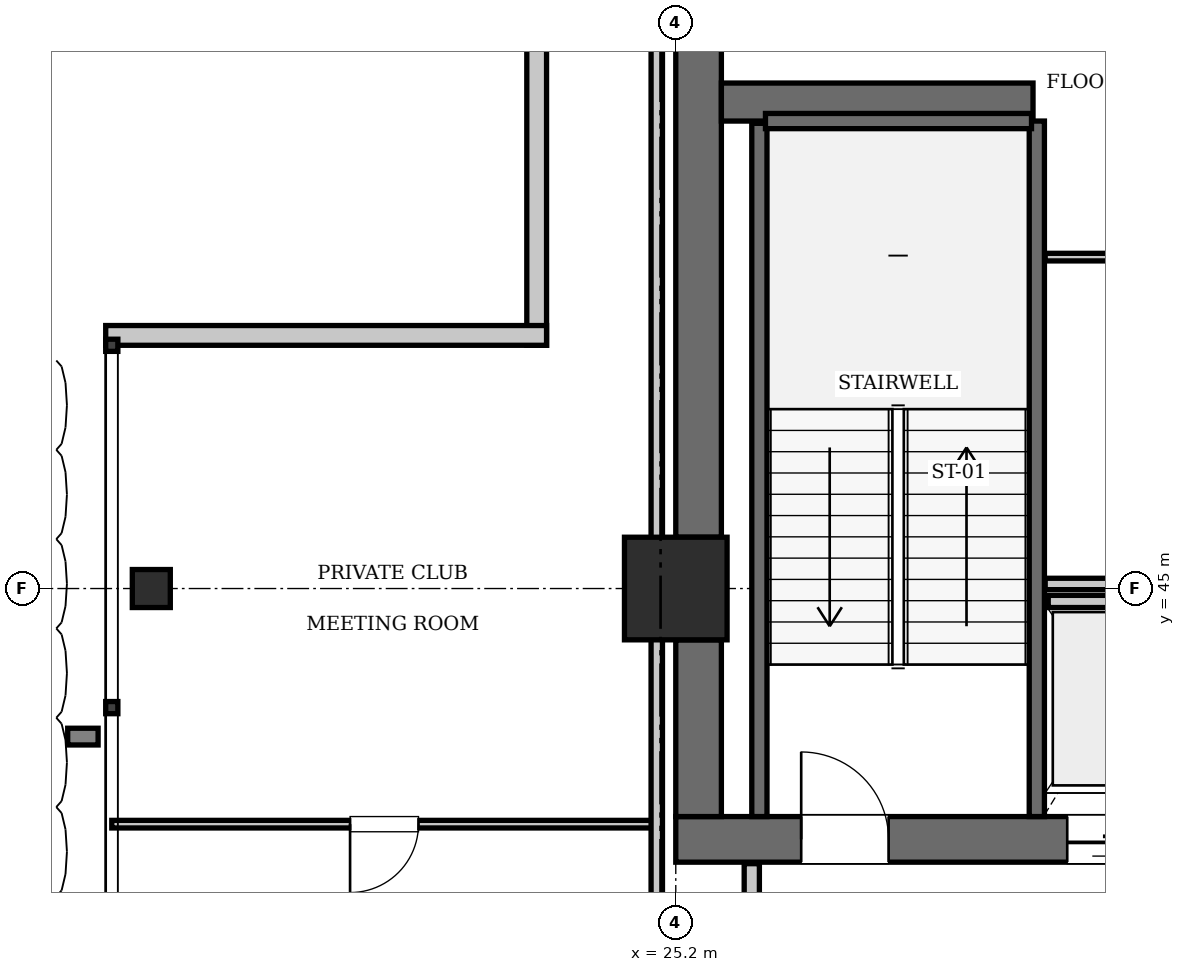
"""IFC4 building model, lengths in metres.
Left out: names, types, materials, properties, quantities, classifications, styles, units other than length and angle.
Written with IfcOpenShell. Run it as: python <this file> out.ifc"""

import sys

from ifc_helpers import new_model, si_unit, direction, frame, frame_2d, origin, origin_2d, place, context, subcontext, project, spatial, rectangle, i_section, extrude, element, fill, save


model = new_model("IFC4")
c1 = context("Model", 3, precision=1e-05, world=origin(), true_north=direction((0.0, 1.0)))
c2 = subcontext(c1, "Body", "Model", "MODEL_VIEW")
j1 = project(units=[si_unit("LENGTHUNIT", "METRE"), si_unit("PLANEANGLEUNIT", "RADIAN")], contexts=[c1])
p1 = place(None, origin())
s1 = spatial("IfcSite", under=j1, at=p1, CompositionType="ELEMENT")
p2 = place(p1, origin())
s2 = spatial("IfcBuilding", under=s1, at=p2, CompositionType="ELEMENT")
p3 = place(p2, frame((0.0, 0.0, 349.65)))
s3 = spatial("IfcBuildingStorey", under=s2, at=p3, CompositionType="ELEMENT", Elevation=349.65)
p4 = place(p3, frame((25.2, 45.0, 0.0), z_axis=(0.0, 0.0, 1.0), x_axis=(1.0, 0.0, 0.0)))
e1 = element("IfcColumn", 1, at=p4, inside=s3, PredefinedType="COLUMN", context=c2, shape_type="SweptSolid", body=[
    extrude(rectangle(XDim=1.35, YDim=1.35, at=origin_2d()), origin(), (0.0, 0.0, 1.0), 4.55),
])
p5 = place(p3, frame((25.2, 41.7, 0.0), z_axis=(0.0, 0.0, 1.0), x_axis=(1.0, 0.0, 0.0)))
e2 = element("IfcWall", 2, at=p5, inside=s3, PredefinedType="SHEAR", context=c2, shape_type="SweptSolid", body=[
    extrude(rectangle(XDim=6.8, YDim=0.6, at=frame_2d((3.4, 0.0))), origin(), (0.0, 0.0, 1.0), 4.55),
])
p6 = place(p5, frame((1.65, 0.0, 0.0)))
e3 = element("IfcOpeningElement", 3, at=p6, cuts=e2, PredefinedType="OPENING", context=c2, shape_type="SweptSolid", body=[
    extrude(rectangle(XDim=1.15, YDim=2.15, at=frame_2d((0.575, 1.075))), frame((0.0, 0.31, 0.0), z_axis=(0.0, -1.0, 0.0), x_axis=(1.0, 0.0, 0.0)), (0.0, 0.0, 1.0), 0.62),
])
p7 = place(p5, frame((5.15, 0.0, 0.0)))
e4 = element("IfcOpeningElement", 4, at=p7, cuts=e2, PredefinedType="OPENING", context=c2, shape_type="SweptSolid", body=[
    extrude(rectangle(XDim=1.1, YDim=2.2, at=frame_2d((0.55, 1.1))), frame((0.0, 0.31, 0.0), z_axis=(0.0, -1.0, 0.0), x_axis=(1.0, 0.0, 0.0)), (0.0, 0.0, 1.0), 0.62),
])
p8 = place(p3, frame((25.5, 42.0, 0.0), z_axis=(0.0, 0.0, 1.0), x_axis=(0.0, 1.0, 0.0)))
e5 = element("IfcWall", 5, at=p8, inside=s3, PredefinedType="SHEAR", context=c2, shape_type="SweptSolid", body=[
    extrude(rectangle(XDim=2.325, YDim=0.6, at=frame_2d((1.163, 0.0))), origin(), (0.0, 0.0, 1.0), 4.55),
])
p9 = place(p3, frame((25.5, 45.675, 0.0), z_axis=(0.0, 0.0, 1.0), x_axis=(0.0, 1.0, 0.0)))
e6 = element("IfcWall", 6, at=p9, inside=s3, PredefinedType="SHEAR", context=c2, shape_type="SweptSolid", body=[
    extrude(rectangle(XDim=7.725, YDim=0.6, at=frame_2d((3.862, 0.0))), origin(), (0.0, 0.0, 1.0), 4.55),
])
p10 = place(p3, frame((25.8, 51.4, 0.0), z_axis=(0.0, 0.0, 1.0), x_axis=(1.0, 0.0, 0.0)))
e7 = element("IfcWall", 7, at=p10, inside=s3, PredefinedType="SHEAR", context=c2, shape_type="SweptSolid", body=[
    extrude(rectangle(XDim=4.1, YDim=0.5, at=frame_2d((2.05, 0.0))), origin(), (0.0, 0.0, 1.0), 4.55),
])
p11 = place(p3, frame((18.3, 45.0, 0.0), z_axis=(0.0, 0.0, 1.0), x_axis=(1.0, 0.0, 0.0)))
e8 = element("IfcColumn", 8, at=p11, inside=s3, PredefinedType="COLUMN", context=c2, shape_type="SweptSolid", body=[
    extrude(i_section(OverallWidth=0.5, OverallDepth=0.5, WebThickness=0.022, FlangeThickness=0.032, at=origin_2d()), origin(), (0.0, 0.0, 1.0), 4.55),
])
p12 = place(p3, frame((29.95, 42.0, 0.0), z_axis=(0.0, 0.0, 1.0), x_axis=(0.0, 1.0, 0.0)))
e9 = element("IfcWall", 9, at=p12, inside=s3, PredefinedType="SOLIDWALL", context=c2, shape_type="SweptSolid", body=[
    extrude(rectangle(XDim=9.15, YDim=0.2, at=frame_2d((4.575, 0.0))), origin(), (0.0, 0.0, 1.0), 4.29),
])
p13 = place(p3, frame((26.3, 42.0, 0.0), z_axis=(0.0, 0.0, 1.0), x_axis=(0.0, 1.0, 0.0)))
e10 = element("IfcWall", 10, at=p13, inside=s3, PredefinedType="SOLIDWALL", context=c2, shape_type="SweptSolid", body=[
    extrude(rectangle(XDim=9.12, YDim=0.2, at=frame_2d((4.56, 0.0))), origin(), (0.0, 0.0, 1.0), 4.29),
])
p14 = place(p3, frame((26.38, 51.15, 0.0), z_axis=(0.0, 0.0, 1.0), x_axis=(1.0, 0.0, 0.0)))
e11 = element("IfcWall", 11, at=p14, inside=s3, PredefinedType="SOLIDWALL", context=c2, shape_type="SweptSolid", body=[
    extrude(rectangle(XDim=3.5, YDim=0.2, at=frame_2d((1.75, 0.0))), origin(), (0.0, 0.0, 1.0), 4.29),
])
p15 = place(p3, frame((30.1, 44.83, 0.0), z_axis=(0.0, 0.0, 1.0), x_axis=(1.0, 0.0, 0.0)))
e12 = element("IfcWall", 12, at=p15, inside=s3, PredefinedType="SOLIDWALL", context=c2, shape_type="SweptSolid", body=[
    extrude(rectangle(XDim=1.6, YDim=0.16, at=frame_2d((0.8, 0.0))), origin(), (0.0, 0.0, 1.0), 4.29),
])
for number, where, z_axis, x_axis in (
    (13, (23.37, 48.2, 0.0), (0.0, 0.0, 1.0), (0.0, 1.0, 0.0)),
    (14, (17.7, 48.33, 0.0), (0.0, 0.0, 1.0), (1.0, 0.0, 0.0)),
):
    element("IfcWall", number, at=place(p3, frame(where, z_axis=z_axis, x_axis=x_axis)), inside=s3, PredefinedType="SOLIDWALL", context=c2, shape_type="SweptSolid", body=[
        extrude(rectangle(XDim=5.8, YDim=0.26, at=frame_2d((2.9, 0.0))), origin(), (0.0, 0.0, 1.0), 4.29),
    ])
p16 = place(p3, frame((26.2, 38.31, 0.0), z_axis=(0.0, 0.0, 1.0), x_axis=(0.0, 1.0, 0.0)))
e15 = element("IfcWall", 15, at=p16, inside=s3, PredefinedType="PARTITIONING", context=c2, shape_type="SweptSolid", body=[
    extrude(rectangle(XDim=3.07, YDim=0.2, at=frame_2d((1.535, 0.0))), origin(), (0.0, 0.0, 1.0), 4.29),
])
p17 = place(p3, frame((30.06, 45.06, 0.0), z_axis=(0.0, 0.0, 1.0), x_axis=(1.0, 0.0, 0.0)))
e16 = element("IfcWall", 16, at=p17, inside=s3, PredefinedType="PARTITIONING", context=c2, shape_type="SweptSolid", body=[
    extrude(rectangle(XDim=3.18, YDim=0.15, at=frame_2d((1.59, 0.0))), origin(), (0.0, 0.0, 1.0), 4.29),
])
p18 = place(p3, frame((30.06, 49.36, 0.0), z_axis=(0.0, 0.0, 1.0), x_axis=(1.0, 0.0, 0.0)))
e17 = element("IfcWall", 17, at=p18, inside=s3, PredefinedType="PARTITIONING", context=c2, shape_type="SweptSolid", body=[
    extrude(rectangle(XDim=3.18, YDim=0.1, at=frame_2d((1.59, 0.0))), origin(), (0.0, 0.0, 1.0), 4.29),
])
p19 = place(p18, frame((1.95, 0.0, 0.0)))
e18 = element("IfcOpeningElement", 18, at=p19, cuts=e17, PredefinedType="OPENING", context=c2, shape_type="SweptSolid", body=[
    extrude(rectangle(XDim=0.8, YDim=2.05, at=frame_2d((0.4, 1.025))), frame((0.0, 0.06, 0.0), z_axis=(0.0, -1.0, 0.0), x_axis=(1.0, 0.0, 0.0)), (0.0, 0.0, 1.0), 0.12),
])
p20 = place(p3, frame((17.78, 41.9, 0.0), z_axis=(0.0, 0.0, 1.0), x_axis=(1.0, 0.0, 0.0)))
e19 = element("IfcWall", 19, at=p20, inside=s3, PredefinedType="PARTITIONING", context=c2, shape_type="SweptSolid", body=[
    extrude(rectangle(XDim=7.17, YDim=0.1, at=frame_2d((3.585, 0.0))), origin(), (0.0, 0.0, 1.0), 4.29),
])
p21 = place(p20, frame((3.135, 0.0, 0.0)))
e20 = element("IfcOpeningElement", 20, at=p21, cuts=e19, PredefinedType="OPENING", context=c2, shape_type="SweptSolid", body=[
    extrude(rectangle(XDim=0.9, YDim=2.1, at=frame_2d((0.45, 1.05))), frame((0.0, 0.06, 0.0), z_axis=(0.0, -1.0, 0.0), x_axis=(1.0, 0.0, 0.0)), (0.0, 0.0, 1.0), 0.12),
])
p22 = place(p3, frame((24.95, 35.14, 0.0), z_axis=(0.0, 0.0, 1.0), x_axis=(0.0, 1.0, 0.0)))
e21 = element("IfcWall", 21, at=p22, inside=s3, PredefinedType="PARTITIONING", context=c2, shape_type="SweptSolid", body=[
    extrude(rectangle(XDim=18.78, YDim=0.15, at=frame_2d((9.39, 0.0))), origin(), (0.0, 0.0, 1.0), 4.29),
])
p23 = place(p6, origin())
e22 = element("IfcDoor", 22, at=p23, inside=s3, OperationType="SINGLE_SWING_LEFT", PredefinedType="DOOR", context=c2, shape_type="SweptSolid", body=[
    extrude(rectangle(XDim=1.15, YDim=2.15, at=frame_2d((0.575, 1.075))), frame((0.0, 0.025, 0.0), z_axis=(0.0, -1.0, 0.0), x_axis=(1.0, 0.0, 0.0)), (0.0, 0.0, 1.0), 0.05),
])
fill(e3, e22)
p24 = place(p7, frame((1.1, 0.0, 0.0), z_axis=(0.0, 0.0, 1.0), x_axis=(-1.0, 0.0, 0.0)))
e23 = element("IfcDoor", 23, at=p24, inside=s3, OperationType="SLIDING_TO_LEFT", PredefinedType="DOOR", context=c2, shape_type="SweptSolid", body=[
    extrude(rectangle(XDim=1.1, YDim=2.2, at=frame_2d((0.55, 1.1))), frame((0.0, 0.025, 0.0), z_axis=(0.0, -1.0, 0.0), x_axis=(1.0, 0.0, 0.0)), (0.0, 0.0, 1.0), 0.05),
])
fill(e4, e23)
p25 = place(p21, frame((0.9, 0.0, 0.0), z_axis=(0.0, 0.0, 1.0), x_axis=(-1.0, 0.0, 0.0)))
e24 = element("IfcDoor", 24, at=p25, inside=s3, OperationType="SINGLE_SWING_RIGHT", PredefinedType="DOOR", context=c2, shape_type="SweptSolid", body=[
    extrude(rectangle(XDim=0.9, YDim=2.1, at=frame_2d((0.45, 1.05))), frame((0.0, 0.025, 0.0), z_axis=(0.0, -1.0, 0.0), x_axis=(1.0, 0.0, 0.0)), (0.0, 0.0, 1.0), 0.05),
])
fill(e20, e24)
save(model, sys.argv[1])
